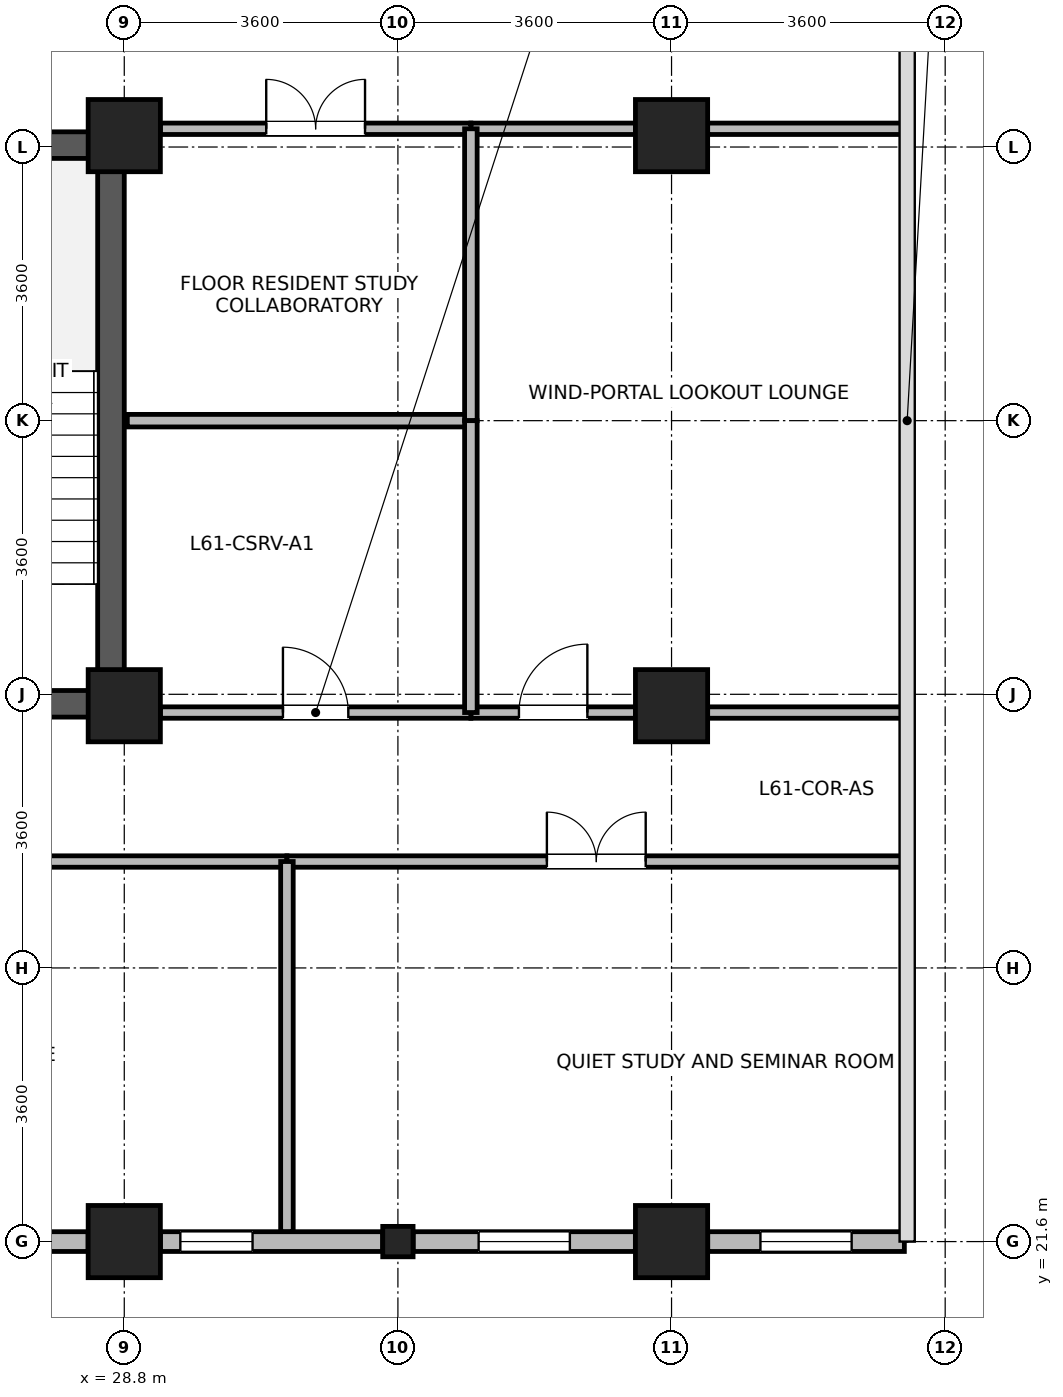
"""IFC4 building model, lengths in metres.
Left out: names, types, materials, properties, quantities, classifications, styles, units other than length and angle.
Written with IfcOpenShell. Run it as: python <this file> out.ifc"""

import sys

from ifc_helpers import new_model, si_unit, direction, frame, frame_2d, origin, origin_2d, place, context, subcontext, project, spatial, rectangle, i_section, extrude, source, transform, mapped, element, fill, save


model = new_model("IFC4")
c1 = context("Model", 3, precision=1e-05, world=origin(), true_north=direction((0.0, 1.0)))
c2 = subcontext(c1, "Body", "Model", "MODEL_VIEW")
j1 = project(units=[si_unit("LENGTHUNIT", "METRE"), si_unit("PLANEANGLEUNIT", "RADIAN")], contexts=[c1])
p1 = place(None, origin())
s1 = spatial("IfcSite", under=j1, at=p1, CompositionType="ELEMENT")
p2 = place(p1, origin())
s2 = spatial("IfcBuilding", under=s1, at=p2, CompositionType="ELEMENT")
p3 = place(p2, frame((0.0, 0.0, 238.8)))
s3 = spatial("IfcBuildingStorey", under=s2, at=p3, CompositionType="ELEMENT", Elevation=238.8)
p4 = place(p3, frame((28.625, 28.5, 0.0), z_axis=(0.0, 0.0, 1.0), x_axis=(0.0, 1.0, 0.0)))
e1 = element("IfcWall", 1, at=p4, inside=s3, PredefinedType="SHEAR", context=c2, shape_type="SweptSolid", body=[
    extrude(rectangle(XDim=7.7, YDim=0.35, at=frame_2d((3.85, 0.0))), origin(), (0.0, 0.0, 1.0), 3.44),
])
for number, where, z_axis, x_axis in (
    (2, (25.25, 28.675, 0.0), (0.0, 0.0, 1.0), (1.0, 0.0, 0.0)),
    (3, (25.25, 36.025, 0.0), (0.0, 0.0, 1.0), (1.0, 0.0, 0.0)),
):
    element("IfcWall", number, at=place(p3, frame(where, z_axis=z_axis, x_axis=x_axis)), inside=s3, PredefinedType="SHEAR", context=c2, shape_type="SweptSolid", body=[
        extrude(rectangle(XDim=3.2, YDim=0.35, at=frame_2d((1.6, 0.0))), origin(), (0.0, 0.0, 1.0), 3.44),
    ])
m1 = source(origin(), c2, "Body", "SweptSolid", [
    extrude(rectangle(XDim=0.95, YDim=0.95, at=origin_2d()), origin(), (0.0, 0.0, 1.0), 3.7),
])
for number, where, z_axis, x_axis in (
    (4, (28.8, 21.6, 0.0), (0.0, 0.0, 1.0), (1.0, 0.0, 0.0)),
    (5, (28.8, 28.65, 0.0), (0.0, 0.0, 1.0), (1.0, 0.0, 0.0)),
    (6, (28.8, 36.15, 0.0), (0.0, 0.0, 1.0), (1.0, 0.0, 0.0)),
    (7, (36.0, 21.6, 0.0), (0.0, 0.0, 1.0), (1.0, 0.0, 0.0)),
    (8, (36.0, 28.65, 0.0), (0.0, 0.0, 1.0), (1.0, 0.0, 0.0)),
    (9, (36.0, 36.15, 0.0), (0.0, 0.0, 1.0), (1.0, 0.0, 0.0)),
):
    element("IfcColumn", number, at=place(p3, frame(where, z_axis=z_axis, x_axis=x_axis)), inside=s3, PredefinedType="COLUMN", context=c2, shape_type="MappedRepresentation", body=[
        mapped(m1, transform((0.0, 0.0, 0.0), x_axis=(1.0, 0.0, 0.0), y_axis=(0.0, 1.0, 0.0), z_axis=(0.0, 0.0, 1.0), scale=1.0)),
    ])
m2 = source(origin(), c2, "Body", "SweptSolid", [
    extrude(i_section(OverallWidth=0.399, OverallDepth=0.4, WebThickness=0.017, FlangeThickness=0.023, FilletRadius=0.015, at=origin_2d()), origin(), (0.0, 0.0, 1.0), 3.7),
])
p5 = place(p3, frame((32.4, 21.6, 0.0), z_axis=(0.0, 0.0, 1.0), x_axis=(1.0, 0.0, 0.0)))
e10 = element("IfcColumn", 10, at=p5, inside=s3, PredefinedType="COLUMN", context=c2, shape_type="MappedRepresentation", body=[
    mapped(m2, transform((0.0, 0.0, 0.0), x_axis=(1.0, 0.0, 0.0), y_axis=(0.0, 1.0, 0.0), z_axis=(0.0, 0.0, 1.0), scale=1.0)),
])
p6 = place(p3, frame((28.324, 21.6, 0.0), z_axis=(0.0, 0.0, 1.0), x_axis=(-1.0, 0.0, 0.0)))
e11 = element("IfcWall", 11, at=p6, inside=s3, PredefinedType="STANDARD", context=c2, shape_type="SweptSolid", body=[
    extrude(rectangle(XDim=2.924, YDim=0.26, at=frame_2d((1.462, 0.0))), origin(), (0.0, 0.0, 1.0), 3.02),
])
p7 = place(p6, frame((0.862, 0.0, 0.85)))
e12 = element("IfcOpeningElement", 12, at=p7, cuts=e11, PredefinedType="OPENING", context=c2, shape_type="SweptSolid", body=[
    extrude(rectangle(XDim=1.2, YDim=1.75, at=frame_2d((0.6, 0.875))), frame((0.0, 0.14, 0.0), z_axis=(0.0, -1.0, 0.0), x_axis=(1.0, 0.0, 0.0)), (0.0, 0.0, 1.0), 0.28),
])
p8 = place(p3, frame((32.199, 21.6, 0.0), z_axis=(0.0, 0.0, 1.0), x_axis=(-1.0, 0.0, 0.0)))
e13 = element("IfcWall", 13, at=p8, inside=s3, PredefinedType="STANDARD", context=c2, shape_type="SweptSolid", body=[
    extrude(rectangle(XDim=2.924, YDim=0.26, at=frame_2d((1.462, 0.0))), origin(), (0.0, 0.0, 1.0), 3.02),
])
p9 = place(p8, frame((1.712, 0.0, 0.85)))
e14 = element("IfcOpeningElement", 14, at=p9, cuts=e13, PredefinedType="OPENING", context=c2, shape_type="SweptSolid", body=[
    extrude(rectangle(XDim=0.95, YDim=1.75, at=frame_2d((0.475, 0.875))), frame((0.0, 0.14, 0.0), z_axis=(0.0, -1.0, 0.0), x_axis=(1.0, 0.0, 0.0)), (0.0, 0.0, 1.0), 0.28),
])
p10 = place(p3, frame((35.524, 21.6, 0.0), z_axis=(0.0, 0.0, 1.0), x_axis=(-1.0, 0.0, 0.0)))
e15 = element("IfcWall", 15, at=p10, inside=s3, PredefinedType="STANDARD", context=c2, shape_type="SweptSolid", body=[
    extrude(rectangle(XDim=2.923, YDim=0.26, at=frame_2d((1.462, 0.0))), origin(), (0.0, 0.0, 1.0), 3.02),
])
p11 = place(p10, frame((0.862, 0.0, 0.85)))
e16 = element("IfcOpeningElement", 16, at=p11, cuts=e15, PredefinedType="OPENING", context=c2, shape_type="SweptSolid", body=[
    extrude(rectangle(XDim=1.2, YDim=1.75, at=frame_2d((0.6, 0.875))), frame((0.0, 0.14, 0.0), z_axis=(0.0, -1.0, 0.0), x_axis=(1.0, 0.0, 0.0)), (0.0, 0.0, 1.0), 0.28),
])
p12 = place(p3, frame((39.063, 21.6, 0.0), z_axis=(0.0, 0.0, 1.0), x_axis=(-1.0, 0.0, 0.0)))
e17 = element("IfcWall", 17, at=p12, inside=s3, PredefinedType="STANDARD", context=c2, shape_type="SweptSolid", body=[
    extrude(rectangle(XDim=2.587, YDim=0.26, at=frame_2d((1.293, 0.0))), origin(), (0.0, 0.0, 1.0), 3.42),
])
p13 = place(p12, frame((0.694, 0.0, 0.85)))
e18 = element("IfcOpeningElement", 18, at=p13, cuts=e17, PredefinedType="OPENING", context=c2, shape_type="SweptSolid", body=[
    extrude(rectangle(XDim=1.2, YDim=1.75, at=frame_2d((0.6, 0.875))), frame((0.0, 0.14, 0.0), z_axis=(0.0, -1.0, 0.0), x_axis=(1.0, 0.0, 0.0)), (0.0, 0.0, 1.0), 0.28),
])
p14 = place(p3, frame((16.4, 26.6, 0.0), z_axis=(0.0, 0.0, 1.0), x_axis=(1.0, 0.0, 0.0)))
e19 = element("IfcWall", 19, at=p14, inside=s3, PredefinedType="PARTITIONING", context=c2, shape_type="SweptSolid", body=[
    extrude(rectangle(XDim=14.54, YDim=0.15, at=frame_2d((7.27, 0.0))), origin(), (0.0, 0.0, 1.0), 3.42),
])
p15 = place(p14, frame((6.62, 0.0, 0.0)))
e20 = element("IfcOpeningElement", 20, at=p15, cuts=e19, PredefinedType="OPENING", context=c2, shape_type="SweptSolid", body=[
    extrude(rectangle(XDim=1.3, YDim=2.12, at=frame_2d((0.65, 1.06))), frame((0.0, 0.085, 0.0), z_axis=(0.0, -1.0, 0.0), x_axis=(1.0, 0.0, 0.0)), (0.0, 0.0, 1.0), 0.17),
])
p16 = place(p3, frame((30.94, 26.6, 0.0), z_axis=(0.0, 0.0, 1.0), x_axis=(1.0, 0.0, 0.0)))
e21 = element("IfcWall", 21, at=p16, inside=s3, PredefinedType="PARTITIONING", context=c2, shape_type="SweptSolid", body=[
    extrude(rectangle(XDim=8.14, YDim=0.15, at=frame_2d((4.07, 0.0))), origin(), (0.0, 0.0, 1.0), 3.42),
])
p17 = place(p16, frame((3.42, 0.0, 0.0)))
e22 = element("IfcOpeningElement", 22, at=p17, cuts=e21, PredefinedType="OPENING", context=c2, shape_type="SweptSolid", body=[
    extrude(rectangle(XDim=1.3, YDim=2.12, at=frame_2d((0.65, 1.06))), frame((0.0, 0.085, 0.0), z_axis=(0.0, -1.0, 0.0), x_axis=(1.0, 0.0, 0.0)), (0.0, 0.0, 1.0), 0.17),
])
p18 = place(p3, frame((33.36, 28.56, 0.0), z_axis=(0.0, 0.0, 1.0), x_axis=(1.0, 0.0, 0.0)))
e23 = element("IfcWall", 23, at=p18, inside=s3, PredefinedType="PARTITIONING", context=c2, shape_type="SweptSolid", body=[
    extrude(rectangle(XDim=2.165, YDim=0.15, at=frame_2d((1.083, 0.0))), origin(), (0.0, 0.0, 1.0), 2.87),
])
p19 = place(p18, frame((0.633, 0.0, 0.0)))
e24 = element("IfcOpeningElement", 24, at=p19, cuts=e23, PredefinedType="OPENING", context=c2, shape_type="SweptSolid", body=[
    extrude(rectangle(XDim=0.9, YDim=2.08, at=frame_2d((0.45, 1.04))), frame((0.0, 0.085, 0.0), z_axis=(0.0, -1.0, 0.0), x_axis=(1.0, 0.0, 0.0)), (0.0, 0.0, 1.0), 0.17),
])
p20 = place(p3, frame((36.475, 28.56, 0.0), z_axis=(0.0, 0.0, 1.0), x_axis=(1.0, 0.0, 0.0)))
e25 = element("IfcWall", 25, at=p20, inside=s3, PredefinedType="PARTITIONING", context=c2, shape_type="SweptSolid", body=[
    extrude(rectangle(XDim=2.605, YDim=0.15, at=frame_2d((1.302, 0.0))), origin(), (0.0, 0.0, 1.0), 3.42),
])
p21 = place(p3, frame((33.36, 36.24, 0.0), z_axis=(0.0, 0.0, 1.0), x_axis=(1.0, 0.0, 0.0)))
e26 = element("IfcWall", 26, at=p21, inside=s3, PredefinedType="PARTITIONING", context=c2, shape_type="SweptSolid", body=[
    extrude(rectangle(XDim=2.165, YDim=0.15, at=frame_2d((1.083, 0.0))), origin(), (0.0, 0.0, 1.0), 2.87),
])
p22 = place(p3, frame((36.475, 36.24, 0.0), z_axis=(0.0, 0.0, 1.0), x_axis=(1.0, 0.0, 0.0)))
e27 = element("IfcWall", 27, at=p22, inside=s3, PredefinedType="PARTITIONING", context=c2, shape_type="SweptSolid", body=[
    extrude(rectangle(XDim=2.605, YDim=0.15, at=frame_2d((1.302, 0.0))), origin(), (0.0, 0.0, 1.0), 3.42),
])
p23 = place(p3, frame((29.275, 28.56, 0.0), z_axis=(0.0, 0.0, 1.0), x_axis=(1.0, 0.0, 0.0)))
e28 = element("IfcWall", 28, at=p23, inside=s3, PredefinedType="PARTITIONING", context=c2, shape_type="SweptSolid", body=[
    extrude(rectangle(XDim=4.085, YDim=0.15, at=frame_2d((2.042, 0.0))), origin(), (0.0, 0.0, 1.0), 2.87),
])
p24 = place(p23, frame((1.613, 0.0, 0.0)))
e29 = element("IfcOpeningElement", 29, at=p24, cuts=e28, PredefinedType="OPENING", context=c2, shape_type="SweptSolid", body=[
    extrude(rectangle(XDim=0.86, YDim=2.02, at=frame_2d((0.43, 1.01))), frame((0.0, 0.085, 0.0), z_axis=(0.0, -1.0, 0.0), x_axis=(1.0, 0.0, 0.0)), (0.0, 0.0, 1.0), 0.17),
])
p25 = place(p3, frame((29.275, 36.24, 0.0), z_axis=(0.0, 0.0, 1.0), x_axis=(1.0, 0.0, 0.0)))
e30 = element("IfcWall", 30, at=p25, inside=s3, PredefinedType="PARTITIONING", context=c2, shape_type="SweptSolid", body=[
    extrude(rectangle(XDim=4.085, YDim=0.15, at=frame_2d((2.042, 0.0))), origin(), (0.0, 0.0, 1.0), 2.87),
])
p26 = place(p25, frame((1.393, 0.0, 0.0)))
e31 = element("IfcOpeningElement", 31, at=p26, cuts=e30, PredefinedType="OPENING", context=c2, shape_type="SweptSolid", body=[
    extrude(rectangle(XDim=1.3, YDim=2.12, at=frame_2d((0.65, 1.06))), frame((0.0, 0.085, 0.0), z_axis=(0.0, -1.0, 0.0), x_axis=(1.0, 0.0, 0.0)), (0.0, 0.0, 1.0), 0.17),
])
p27 = place(p3, frame((30.94, 21.732, 0.0), z_axis=(0.0, 0.0, 1.0), x_axis=(0.0, 1.0, 0.0)))
e32 = element("IfcWall", 32, at=p27, inside=s3, PredefinedType="PARTITIONING", context=c2, shape_type="SweptSolid", body=[
    extrude(rectangle(XDim=4.868, YDim=0.165, at=frame_2d((2.434, 0.0))), origin(), (0.0, 0.0, 1.0), 3.42),
])
p28 = place(p3, frame((28.84, 32.4, 0.0), z_axis=(0.0, 0.0, 1.0), x_axis=(1.0, 0.0, 0.0)))
e33 = element("IfcWall", 33, at=p28, inside=s3, PredefinedType="PARTITIONING", context=c2, shape_type="SweptSolid", body=[
    extrude(rectangle(XDim=4.52, YDim=0.165, at=frame_2d((2.26, 0.0))), origin(), (0.0, 0.0, 1.0), 3.42),
])
p29 = place(p3, frame((33.36, 32.4, 0.0), z_axis=(0.0, 0.0, 1.0), x_axis=(0.0, 1.0, 0.0)))
e34 = element("IfcWall", 34, at=p29, inside=s3, PredefinedType="PARTITIONING", context=c2, shape_type="SweptSolid", body=[
    extrude(rectangle(XDim=3.84, YDim=0.165, at=frame_2d((1.92, 0.0))), origin(), (0.0, 0.0, 1.0), 3.42),
])
p30 = place(p3, frame((33.36, 28.56, 0.0), z_axis=(0.0, 0.0, 1.0), x_axis=(0.0, 1.0, 0.0)))
e35 = element("IfcWall", 35, at=p30, inside=s3, PredefinedType="PARTITIONING", context=c2, shape_type="SweptSolid", body=[
    extrude(rectangle(XDim=3.84, YDim=0.165, at=frame_2d((1.92, 0.0))), origin(), (0.0, 0.0, 1.0), 3.42),
])
p31 = place(p9, origin())
e36 = element("IfcWindow", 36, at=p31, inside=s3, PartitioningType="SINGLE_PANEL", PredefinedType="WINDOW", context=c2, shape_type="SweptSolid", body=[
    extrude(rectangle(XDim=0.95, YDim=1.75, at=frame_2d((0.475, 0.875))), frame((0.0, 0.03, 0.0), z_axis=(0.0, -1.0, 0.0), x_axis=(1.0, 0.0, 0.0)), (0.0, 0.0, 1.0), 0.06),
])
fill(e14, e36)
p32 = place(p11, origin())
e37 = element("IfcWindow", 37, at=p32, inside=s3, PartitioningType="SINGLE_PANEL", PredefinedType="WINDOW", context=c2, shape_type="SweptSolid", body=[
    extrude(rectangle(XDim=1.2, YDim=1.75, at=frame_2d((0.6, 0.875))), frame((0.0, 0.03, 0.0), z_axis=(0.0, -1.0, 0.0), x_axis=(1.0, 0.0, 0.0)), (0.0, 0.0, 1.0), 0.06),
])
fill(e16, e37)
p33 = place(p13, origin())
e38 = element("IfcWindow", 38, at=p33, inside=s3, PartitioningType="SINGLE_PANEL", PredefinedType="WINDOW", context=c2, shape_type="SweptSolid", body=[
    extrude(rectangle(XDim=1.2, YDim=1.75, at=frame_2d((0.6, 0.875))), frame((0.0, 0.03, 0.0), z_axis=(0.0, -1.0, 0.0), x_axis=(1.0, 0.0, 0.0)), (0.0, 0.0, 1.0), 0.06),
])
fill(e18, e38)
p34 = place(p17, origin())
e39 = element("IfcDoor", 39, at=p34, inside=s3, OperationType="DOUBLE_DOOR_SINGLE_SWING", PredefinedType="DOOR", context=c2, shape_type="SweptSolid", body=[
    extrude(rectangle(XDim=1.3, YDim=2.12, at=frame_2d((0.65, 1.06))), frame((0.0, 0.025, 0.0), z_axis=(0.0, -1.0, 0.0), x_axis=(1.0, 0.0, 0.0)), (0.0, 0.0, 1.0), 0.05),
])
fill(e22, e39)
p35 = place(p19, origin())
e40 = element("IfcDoor", 40, at=p35, inside=s3, OperationType="SINGLE_SWING_RIGHT", PredefinedType="DOOR", context=c2, shape_type="SweptSolid", body=[
    extrude(rectangle(XDim=0.9, YDim=2.08, at=frame_2d((0.45, 1.04))), frame((0.0, 0.025, 0.0), z_axis=(0.0, -1.0, 0.0), x_axis=(1.0, 0.0, 0.0)), (0.0, 0.0, 1.0), 0.05),
])
fill(e24, e40)
p36 = place(p24, origin())
e41 = element("IfcDoor", 41, at=p36, inside=s3, OperationType="SINGLE_SWING_LEFT", PredefinedType="DOOR", context=c2, shape_type="SweptSolid", body=[
    extrude(rectangle(XDim=0.86, YDim=2.02, at=frame_2d((0.43, 1.01))), frame((0.0, 0.025, 0.0), z_axis=(0.0, -1.0, 0.0), x_axis=(1.0, 0.0, 0.0)), (0.0, 0.0, 1.0), 0.05),
])
fill(e29, e41)
p37 = place(p26, origin())
e42 = element("IfcDoor", 42, at=p37, inside=s3, OperationType="DOUBLE_DOOR_SINGLE_SWING", PredefinedType="DOOR", context=c2, shape_type="SweptSolid", body=[
    extrude(rectangle(XDim=1.3, YDim=2.12, at=frame_2d((0.65, 1.06))), frame((0.0, 0.025, 0.0), z_axis=(0.0, -1.0, 0.0), x_axis=(1.0, 0.0, 0.0)), (0.0, 0.0, 1.0), 0.05),
])
fill(e31, e42)
save(model, sys.argv[1])
